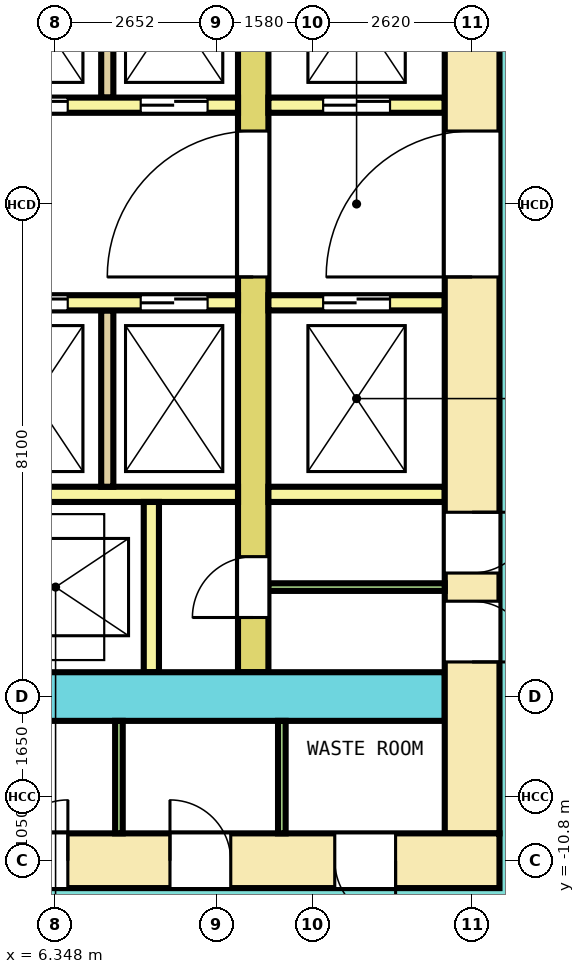
"""IFC4 building model, lengths in metres.
Left out: names, types, materials, properties, quantities, classifications, styles, units other than length and angle.
Written with IfcOpenShell. Run it as: python <this file> out.ifc"""

import sys

from ifc_helpers import new_model, si_unit, direction, frame, frame_2d, origin, place, context, subcontext, project, spatial, rectangle, extrude, element, fill, save


model = new_model("IFC4")
c1 = context("Model", 3, precision=1e-05, world=origin(), true_north=direction((0.0, 1.0)))
c2 = subcontext(c1, "Body", "Model", "MODEL_VIEW")
j1 = project(units=[si_unit("LENGTHUNIT", "METRE"), si_unit("PLANEANGLEUNIT", "RADIAN")], contexts=[c1])
p1 = place(None, origin())
s1 = spatial("IfcSite", under=j1, at=p1, CompositionType="ELEMENT")
p2 = place(p1, origin())
s2 = spatial("IfcBuilding", under=s1, at=p2, CompositionType="ELEMENT")
p3 = place(p2, origin())
s3 = spatial("IfcBuildingStorey", under=s2, at=p3, CompositionType="ELEMENT", Elevation=0.0)
p4 = place(p3, frame((-13.65, -10.8, 0.0), z_axis=(0.0, 0.0, 1.0), x_axis=(1.0, 0.0, 0.0)))
e1 = element("IfcWall", 1, at=p4, inside=s3, PredefinedType="SHEAR", context=c2, shape_type="SweptSolid", body=[
    extrude(rectangle(XDim=27.3, YDim=0.9, at=frame_2d((13.65, 0.0))), origin(), (0.0, 0.0, 1.0), 5.3),
])
p5 = place(p4, frame((2.425, 0.0, 0.0)))
e2 = element("IfcOpeningElement", 2, at=p5, cuts=e1, PredefinedType="OPENING", context=c2, shape_type="SweptSolid", body=[
    extrude(rectangle(XDim=1.0, YDim=2.1, at=frame_2d((0.5, 1.05))), frame((0.0, 0.46, 0.0), z_axis=(0.0, -1.0, 0.0), x_axis=(1.0, 0.0, 0.0)), (0.0, 0.0, 1.0), 0.92),
])
p6 = place(p4, frame((6.569, 0.0, 0.0)))
e3 = element("IfcOpeningElement", 3, at=p6, cuts=e1, PredefinedType="OPENING", context=c2, shape_type="SweptSolid", body=[
    extrude(rectangle(XDim=1.0, YDim=2.1, at=frame_2d((0.5, 1.05))), frame((0.0, 0.46, 0.0), z_axis=(0.0, -1.0, 0.0), x_axis=(1.0, 0.0, 0.0)), (0.0, 0.0, 1.0), 0.92),
])
p7 = place(p4, frame((10.681, 0.0, 0.0)))
e4 = element("IfcOpeningElement", 4, at=p7, cuts=e1, PredefinedType="OPENING", context=c2, shape_type="SweptSolid", body=[
    extrude(rectangle(XDim=1.0, YDim=2.1, at=frame_2d((0.5, 1.05))), frame((0.0, 0.46, 0.0), z_axis=(0.0, -1.0, 0.0), x_axis=(1.0, 0.0, 0.0)), (0.0, 0.0, 1.0), 0.92),
])
p8 = place(p4, frame((19.202, 0.0, 0.0)))
e5 = element("IfcOpeningElement", 5, at=p8, cuts=e1, PredefinedType="OPENING", context=c2, shape_type="SweptSolid", body=[
    extrude(rectangle(XDim=1.0, YDim=2.1, at=frame_2d((0.5, 1.05))), frame((0.0, 0.46, 0.0), z_axis=(0.0, -1.0, 0.0), x_axis=(1.0, 0.0, 0.0)), (0.0, 0.0, 1.0), 0.92),
])
p9 = place(p4, frame((21.881, 0.0, 0.0)))
e6 = element("IfcOpeningElement", 6, at=p9, cuts=e1, PredefinedType="OPENING", context=c2, shape_type="SweptSolid", body=[
    extrude(rectangle(XDim=1.0, YDim=2.1, at=frame_2d((0.5, 1.05))), frame((0.0, 0.46, 0.0), z_axis=(0.0, -1.0, 0.0), x_axis=(1.0, 0.0, 0.0)), (0.0, 0.0, 1.0), 0.92),
])
p10 = place(p4, frame((24.592, 0.0, 0.0)))
e7 = element("IfcOpeningElement", 7, at=p10, cuts=e1, PredefinedType="OPENING", context=c2, shape_type="SweptSolid", body=[
    extrude(rectangle(XDim=1.0, YDim=2.1, at=frame_2d((0.5, 1.05))), frame((0.0, 0.46, 0.0), z_axis=(0.0, -1.0, 0.0), x_axis=(1.0, 0.0, 0.0)), (0.0, 0.0, 1.0), 0.92),
])
p11 = place(p4, frame((15.2, 0.0, 0.0)))
e8 = element("IfcOpeningElement", 8, at=p11, cuts=e1, PredefinedType="OPENING", context=c2, shape_type="SweptSolid", body=[
    extrude(rectangle(XDim=1.2, YDim=2.1, at=frame_2d((0.6, 1.05))), frame((0.0, 0.46, 0.0), z_axis=(0.0, -1.0, 0.0), x_axis=(1.0, 0.0, 0.0)), (0.0, 0.0, 1.0), 0.92),
])
p12 = place(p3, frame((13.2, -10.35, 0.0), z_axis=(0.0, 0.0, 1.0), x_axis=(0.0, 1.0, 0.0)))
e9 = element("IfcWall", 9, at=p12, inside=s3, PredefinedType="SHEAR", context=c2, shape_type="SweptSolid", body=[
    extrude(rectangle(XDim=20.7, YDim=0.9, at=frame_2d((10.35, 0.0))), origin(), (0.0, 0.0, 1.0), 5.3),
])
p13 = place(p12, frame((9.15, 0.0, 0.0)))
e10 = element("IfcOpeningElement", 10, at=p13, cuts=e9, PredefinedType="OPENING", context=c2, shape_type="SweptSolid", body=[
    extrude(rectangle(XDim=2.4, YDim=2.1, at=frame_2d((1.2, 1.05))), frame((0.0, 0.46, 0.0), z_axis=(0.0, -1.0, 0.0), x_axis=(1.0, 0.0, 0.0)), (0.0, 0.0, 1.0), 0.92),
])
p14 = place(p12, frame((16.05, 0.0, 0.0)))
e11 = element("IfcOpeningElement", 11, at=p14, cuts=e9, PredefinedType="OPENING", context=c2, shape_type="SweptSolid", body=[
    extrude(rectangle(XDim=1.2, YDim=2.1, at=frame_2d((0.6, 1.05))), frame((0.0, 0.46, 0.0), z_axis=(0.0, -1.0, 0.0), x_axis=(1.0, 0.0, 0.0)), (0.0, 0.0, 1.0), 0.92),
])
p15 = place(p12, frame((2.819, 0.0, 0.0)))
e12 = element("IfcOpeningElement", 12, at=p15, cuts=e9, PredefinedType="OPENING", context=c2, shape_type="SweptSolid", body=[
    extrude(rectangle(XDim=1.0, YDim=2.1, at=frame_2d((0.5, 1.05))), frame((0.0, 0.46, 0.0), z_axis=(0.0, -1.0, 0.0), x_axis=(1.0, 0.0, 0.0)), (0.0, 0.0, 1.0), 0.92),
])
p16 = place(p12, frame((4.281, 0.0, 0.0)))
e13 = element("IfcOpeningElement", 13, at=p16, cuts=e9, PredefinedType="OPENING", context=c2, shape_type="SweptSolid", body=[
    extrude(rectangle(XDim=1.0, YDim=2.1, at=frame_2d((0.5, 1.05))), frame((0.0, 0.46, 0.0), z_axis=(0.0, -1.0, 0.0), x_axis=(1.0, 0.0, 0.0)), (0.0, 0.0, 1.0), 0.92),
])
p17 = place(p3, frame((-12.75, -8.1, 0.0), z_axis=(0.0, 0.0, 1.0), x_axis=(1.0, 0.0, 0.0)))
e14 = element("IfcWall", 14, at=p17, inside=s3, PredefinedType="SHEAR", context=c2, shape_type="SweptSolid", body=[
    extrude(rectangle(XDim=25.5, YDim=0.8, at=frame_2d((12.75, 0.0))), origin(), (0.0, 0.0, 1.0), 5.3),
])
p18 = place(p17, frame((14.3, 0.0, 0.0)))
e15 = element("IfcOpeningElement", 15, at=p18, cuts=e14, PredefinedType="OPENING", context=c2, shape_type="SweptSolid", body=[
    extrude(rectangle(XDim=1.2, YDim=2.1, at=frame_2d((0.6, 1.05))), frame((0.0, 0.41, 0.0), z_axis=(0.0, -1.0, 0.0), x_axis=(1.0, 0.0, 0.0)), (0.0, 0.0, 1.0), 0.82),
])
p19 = place(p3, frame((9.6, -7.7, 0.0), z_axis=(0.0, 0.0, 1.0), x_axis=(0.0, 1.0, 0.0)))
e16 = element("IfcWall", 16, at=p19, inside=s3, PredefinedType="SHEAR", context=c2, shape_type="SweptSolid", body=[
    extrude(rectangle(XDim=15.4, YDim=0.5, at=frame_2d((7.7, 0.0))), origin(), (0.0, 0.0, 1.0), 5.3),
])
p20 = place(p19, frame((6.5, 0.0, 0.0)))
e17 = element("IfcOpeningElement", 17, at=p20, cuts=e16, PredefinedType="OPENING", context=c2, shape_type="SweptSolid", body=[
    extrude(rectangle(XDim=2.4, YDim=2.1, at=frame_2d((1.2, 1.05))), frame((0.0, 0.26, 0.0), z_axis=(0.0, -1.0, 0.0), x_axis=(1.0, 0.0, 0.0)), (0.0, 0.0, 1.0), 0.52),
])
p21 = place(p19, frame((13.4, 0.0, 0.0)))
e18 = element("IfcOpeningElement", 18, at=p21, cuts=e16, PredefinedType="OPENING", context=c2, shape_type="SweptSolid", body=[
    extrude(rectangle(XDim=1.2, YDim=2.1, at=frame_2d((0.6, 1.05))), frame((0.0, 0.26, 0.0), z_axis=(0.0, -1.0, 0.0), x_axis=(1.0, 0.0, 0.0)), (0.0, 0.0, 1.0), 0.52),
])
p22 = place(p19, frame((0.9, 0.0, 0.0)))
e19 = element("IfcOpeningElement", 19, at=p22, cuts=e16, PredefinedType="OPENING", context=c2, shape_type="SweptSolid", body=[
    extrude(rectangle(XDim=1.0, YDim=2.1, at=frame_2d((0.5, 1.05))), frame((0.0, 0.26, 0.0), z_axis=(0.0, -1.0, 0.0), x_axis=(1.0, 0.0, 0.0)), (0.0, 0.0, 1.0), 0.52),
])
p23 = place(p3, frame((-9.35, 1.625, 0.0), z_axis=(0.0, 0.0, 1.0), x_axis=(1.0, 0.0, 0.0)))
e20 = element("IfcWall", 20, at=p23, inside=s3, PredefinedType="SOLIDWALL", context=c2, shape_type="SweptSolid", body=[
    extrude(rectangle(XDim=18.7, YDim=0.25, at=frame_2d((9.35, 0.0))), origin(), (0.0, 0.0, 1.0), 5.3),
])
p24 = place(p23, frame((0.5, 0.0, 0.0)))
e21 = element("IfcOpeningElement", 21, at=p24, cuts=e20, PredefinedType="OPENING", context=c2, shape_type="SweptSolid", body=[
    extrude(rectangle(XDim=1.1, YDim=2.1, at=frame_2d((0.55, 1.05))), frame((0.0, 0.135, 0.0), z_axis=(0.0, -1.0, 0.0), x_axis=(1.0, 0.0, 0.0)), (0.0, 0.0, 1.0), 0.27),
])
p25 = place(p23, frame((2.85, 0.0, 0.0)))
e22 = element("IfcOpeningElement", 22, at=p25, cuts=e20, PredefinedType="OPENING", context=c2, shape_type="SweptSolid", body=[
    extrude(rectangle(XDim=1.1, YDim=2.1, at=frame_2d((0.55, 1.05))), frame((0.0, 0.135, 0.0), z_axis=(0.0, -1.0, 0.0), x_axis=(1.0, 0.0, 0.0)), (0.0, 0.0, 1.0), 0.27),
])
p26 = place(p23, frame((5.15, 0.0, 0.0)))
e23 = element("IfcOpeningElement", 23, at=p26, cuts=e20, PredefinedType="OPENING", context=c2, shape_type="SweptSolid", body=[
    extrude(rectangle(XDim=1.1, YDim=2.1, at=frame_2d((0.55, 1.05))), frame((0.0, 0.135, 0.0), z_axis=(0.0, -1.0, 0.0), x_axis=(1.0, 0.0, 0.0)), (0.0, 0.0, 1.0), 0.27),
])
p27 = place(p23, frame((7.65, 0.0, 0.0)))
e24 = element("IfcOpeningElement", 24, at=p27, cuts=e20, PredefinedType="OPENING", context=c2, shape_type="SweptSolid", body=[
    extrude(rectangle(XDim=1.1, YDim=2.1, at=frame_2d((0.55, 1.05))), frame((0.0, 0.135, 0.0), z_axis=(0.0, -1.0, 0.0), x_axis=(1.0, 0.0, 0.0)), (0.0, 0.0, 1.0), 0.27),
])
p28 = place(p23, frame((9.95, 0.0, 0.0)))
e25 = element("IfcOpeningElement", 25, at=p28, cuts=e20, PredefinedType="OPENING", context=c2, shape_type="SweptSolid", body=[
    extrude(rectangle(XDim=1.1, YDim=2.1, at=frame_2d((0.55, 1.05))), frame((0.0, 0.135, 0.0), z_axis=(0.0, -1.0, 0.0), x_axis=(1.0, 0.0, 0.0)), (0.0, 0.0, 1.0), 0.27),
])
p29 = place(p23, frame((12.4, 0.0, 0.0)))
e26 = element("IfcOpeningElement", 26, at=p29, cuts=e20, PredefinedType="OPENING", context=c2, shape_type="SweptSolid", body=[
    extrude(rectangle(XDim=1.1, YDim=2.1, at=frame_2d((0.55, 1.05))), frame((0.0, 0.135, 0.0), z_axis=(0.0, -1.0, 0.0), x_axis=(1.0, 0.0, 0.0)), (0.0, 0.0, 1.0), 0.27),
])
p30 = place(p23, frame((14.8, 0.0, 0.0)))
e27 = element("IfcOpeningElement", 27, at=p30, cuts=e20, PredefinedType="OPENING", context=c2, shape_type="SweptSolid", body=[
    extrude(rectangle(XDim=1.1, YDim=2.1, at=frame_2d((0.55, 1.05))), frame((0.0, 0.135, 0.0), z_axis=(0.0, -1.0, 0.0), x_axis=(1.0, 0.0, 0.0)), (0.0, 0.0, 1.0), 0.27),
])
p31 = place(p23, frame((17.1, 0.0, 0.0)))
e28 = element("IfcOpeningElement", 28, at=p31, cuts=e20, PredefinedType="OPENING", context=c2, shape_type="SweptSolid", body=[
    extrude(rectangle(XDim=1.1, YDim=2.1, at=frame_2d((0.55, 1.05))), frame((0.0, 0.135, 0.0), z_axis=(0.0, -1.0, 0.0), x_axis=(1.0, 0.0, 0.0)), (0.0, 0.0, 1.0), 0.27),
])
p32 = place(p3, frame((9.85, 1.625, 0.0), z_axis=(0.0, 0.0, 1.0), x_axis=(1.0, 0.0, 0.0)))
e29 = element("IfcWall", 29, at=p32, inside=s3, PredefinedType="SOLIDWALL", context=c2, shape_type="SweptSolid", body=[
    extrude(rectangle(XDim=2.9, YDim=0.25, at=frame_2d((1.45, 0.0))), origin(), (0.0, 0.0, 1.0), 5.3),
])
p33 = place(p32, frame((0.9, 0.0, 0.0)))
e30 = element("IfcOpeningElement", 30, at=p33, cuts=e29, PredefinedType="OPENING", context=c2, shape_type="SweptSolid", body=[
    extrude(rectangle(XDim=1.1, YDim=2.1, at=frame_2d((0.55, 1.05))), frame((0.0, 0.135, 0.0), z_axis=(0.0, -1.0, 0.0), x_axis=(1.0, 0.0, 0.0)), (0.0, 0.0, 1.0), 0.27),
])
p34 = place(p3, frame((7.2, 1.75, 0.0), z_axis=(0.0, 0.0, 1.0), x_axis=(0.0, 1.0, 0.0)))
e31 = element("IfcWall", 31, at=p34, inside=s3, PredefinedType="SOLIDWALL", context=c2, shape_type="SweptSolid", body=[
    extrude(rectangle(XDim=2.9, YDim=0.2, at=frame_2d((1.45, 0.0))), origin(), (0.0, 0.0, 1.0), 5.3),
])
p35 = place(p3, frame((-9.35, -1.625, 0.0), z_axis=(0.0, 0.0, 1.0), x_axis=(1.0, 0.0, 0.0)))
e32 = element("IfcWall", 32, at=p35, inside=s3, PredefinedType="SOLIDWALL", context=c2, shape_type="SweptSolid", body=[
    extrude(rectangle(XDim=18.7, YDim=0.25, at=frame_2d((9.35, 0.0))), origin(), (0.0, 0.0, 1.0), 5.3),
])
p36 = place(p35, frame((0.5, 0.0, 0.0)))
e33 = element("IfcOpeningElement", 33, at=p36, cuts=e32, PredefinedType="OPENING", context=c2, shape_type="SweptSolid", body=[
    extrude(rectangle(XDim=1.1, YDim=2.1, at=frame_2d((0.55, 1.05))), frame((0.0, 0.135, 0.0), z_axis=(0.0, -1.0, 0.0), x_axis=(1.0, 0.0, 0.0)), (0.0, 0.0, 1.0), 0.27),
])
p37 = place(p35, frame((2.85, 0.0, 0.0)))
e34 = element("IfcOpeningElement", 34, at=p37, cuts=e32, PredefinedType="OPENING", context=c2, shape_type="SweptSolid", body=[
    extrude(rectangle(XDim=1.1, YDim=2.1, at=frame_2d((0.55, 1.05))), frame((0.0, 0.135, 0.0), z_axis=(0.0, -1.0, 0.0), x_axis=(1.0, 0.0, 0.0)), (0.0, 0.0, 1.0), 0.27),
])
p38 = place(p35, frame((5.15, 0.0, 0.0)))
e35 = element("IfcOpeningElement", 35, at=p38, cuts=e32, PredefinedType="OPENING", context=c2, shape_type="SweptSolid", body=[
    extrude(rectangle(XDim=1.1, YDim=2.1, at=frame_2d((0.55, 1.05))), frame((0.0, 0.135, 0.0), z_axis=(0.0, -1.0, 0.0), x_axis=(1.0, 0.0, 0.0)), (0.0, 0.0, 1.0), 0.27),
])
p39 = place(p35, frame((7.65, 0.0, 0.0)))
e36 = element("IfcOpeningElement", 36, at=p39, cuts=e32, PredefinedType="OPENING", context=c2, shape_type="SweptSolid", body=[
    extrude(rectangle(XDim=1.1, YDim=2.1, at=frame_2d((0.55, 1.05))), frame((0.0, 0.135, 0.0), z_axis=(0.0, -1.0, 0.0), x_axis=(1.0, 0.0, 0.0)), (0.0, 0.0, 1.0), 0.27),
])
p40 = place(p35, frame((9.95, 0.0, 0.0)))
e37 = element("IfcOpeningElement", 37, at=p40, cuts=e32, PredefinedType="OPENING", context=c2, shape_type="SweptSolid", body=[
    extrude(rectangle(XDim=1.1, YDim=2.1, at=frame_2d((0.55, 1.05))), frame((0.0, 0.135, 0.0), z_axis=(0.0, -1.0, 0.0), x_axis=(1.0, 0.0, 0.0)), (0.0, 0.0, 1.0), 0.27),
])
p41 = place(p35, frame((12.4, 0.0, 0.0)))
e38 = element("IfcOpeningElement", 38, at=p41, cuts=e32, PredefinedType="OPENING", context=c2, shape_type="SweptSolid", body=[
    extrude(rectangle(XDim=1.1, YDim=2.1, at=frame_2d((0.55, 1.05))), frame((0.0, 0.135, 0.0), z_axis=(0.0, -1.0, 0.0), x_axis=(1.0, 0.0, 0.0)), (0.0, 0.0, 1.0), 0.27),
])
p42 = place(p35, frame((14.8, 0.0, 0.0)))
e39 = element("IfcOpeningElement", 39, at=p42, cuts=e32, PredefinedType="OPENING", context=c2, shape_type="SweptSolid", body=[
    extrude(rectangle(XDim=1.1, YDim=2.1, at=frame_2d((0.55, 1.05))), frame((0.0, 0.135, 0.0), z_axis=(0.0, -1.0, 0.0), x_axis=(1.0, 0.0, 0.0)), (0.0, 0.0, 1.0), 0.27),
])
p43 = place(p35, frame((17.1, 0.0, 0.0)))
e40 = element("IfcOpeningElement", 40, at=p43, cuts=e32, PredefinedType="OPENING", context=c2, shape_type="SweptSolid", body=[
    extrude(rectangle(XDim=1.1, YDim=2.1, at=frame_2d((0.55, 1.05))), frame((0.0, 0.135, 0.0), z_axis=(0.0, -1.0, 0.0), x_axis=(1.0, 0.0, 0.0)), (0.0, 0.0, 1.0), 0.27),
])
p44 = place(p3, frame((9.85, -1.625, 0.0), z_axis=(0.0, 0.0, 1.0), x_axis=(1.0, 0.0, 0.0)))
e41 = element("IfcWall", 41, at=p44, inside=s3, PredefinedType="SOLIDWALL", context=c2, shape_type="SweptSolid", body=[
    extrude(rectangle(XDim=2.9, YDim=0.25, at=frame_2d((1.45, 0.0))), origin(), (0.0, 0.0, 1.0), 5.3),
])
p45 = place(p44, frame((0.9, 0.0, 0.0)))
e42 = element("IfcOpeningElement", 42, at=p45, cuts=e41, PredefinedType="OPENING", context=c2, shape_type="SweptSolid", body=[
    extrude(rectangle(XDim=1.1, YDim=2.1, at=frame_2d((0.55, 1.05))), frame((0.0, 0.135, 0.0), z_axis=(0.0, -1.0, 0.0), x_axis=(1.0, 0.0, 0.0)), (0.0, 0.0, 1.0), 0.27),
])
p46 = place(p3, frame((-9.35, -4.775, 0.0), z_axis=(0.0, 0.0, 1.0), x_axis=(1.0, 0.0, 0.0)))
e43 = element("IfcWall", 43, at=p46, inside=s3, PredefinedType="SOLIDWALL", context=c2, shape_type="SweptSolid", body=[
    extrude(rectangle(XDim=18.7, YDim=0.25, at=frame_2d((9.35, 0.0))), origin(), (0.0, 0.0, 1.0), 5.3),
])
p47 = place(p3, frame((9.85, -4.775, 0.0), z_axis=(0.0, 0.0, 1.0), x_axis=(1.0, 0.0, 0.0)))
e44 = element("IfcWall", 44, at=p47, inside=s3, PredefinedType="SOLIDWALL", context=c2, shape_type="SweptSolid", body=[
    extrude(rectangle(XDim=2.9, YDim=0.25, at=frame_2d((1.45, 0.0))), origin(), (0.0, 0.0, 1.0), 5.3),
])
p48 = place(p3, frame((7.2, -4.65, 0.0), z_axis=(0.0, 0.0, 1.0), x_axis=(0.0, 1.0, 0.0)))
e45 = element("IfcWall", 45, at=p48, inside=s3, PredefinedType="SOLIDWALL", context=c2, shape_type="SweptSolid", body=[
    extrude(rectangle(XDim=2.9, YDim=0.2, at=frame_2d((1.45, 0.0))), origin(), (0.0, 0.0, 1.0), 5.3),
])
p49 = place(p3, frame((7.925, -7.7, 0.0), z_axis=(0.0, 0.0, 1.0), x_axis=(0.0, 1.0, 0.0)))
e46 = element("IfcWall", 46, at=p49, inside=s3, PredefinedType="SOLIDWALL", context=c2, shape_type="SweptSolid", body=[
    extrude(rectangle(XDim=2.8, YDim=0.25, at=frame_2d((1.4, 0.0))), origin(), (0.0, 0.0, 1.0), 5.3),
])
p50 = place(p3, frame((9.85, -6.3, 0.0), z_axis=(0.0, 0.0, 1.0), x_axis=(1.0, 0.0, 0.0)))
e47 = element("IfcWall", 47, at=p50, inside=s3, PredefinedType="PARTITIONING", context=c2, shape_type="SweptSolid", body=[
    extrude(rectangle(XDim=2.9, YDim=0.125, at=frame_2d((1.45, 0.0))), origin(), (0.0, 0.0, 1.0), 5.3),
])
for number, where, z_axis, x_axis in (
    (48, (7.392, -10.35, 0.0), (0.0, 0.0, 1.0), (0.0, 1.0, 0.0)),
    (49, (10.071, -10.35, 0.0), (0.0, 0.0, 1.0), (0.0, 1.0, 0.0)),
):
    element("IfcWall", number, at=place(p3, frame(where, z_axis=z_axis, x_axis=x_axis)), inside=s3, PredefinedType="PARTITIONING", context=c2, shape_type="SweptSolid", body=[
        extrude(rectangle(XDim=1.85, YDim=0.125, at=frame_2d((0.925, 0.0))), origin(), (0.0, 0.0, 1.0), 5.3),
    ])
p51 = place(p30, origin())
e50 = element("IfcDoor", 50, at=p51, inside=s3, OperationType="DOUBLE_DOOR_SLIDING", PredefinedType="DOOR", context=c2, shape_type="SweptSolid", body=[
    extrude(rectangle(XDim=1.1, YDim=2.1, at=frame_2d((0.55, 1.05))), frame((0.0, 0.075, 0.0), z_axis=(0.0, -1.0, 0.0), x_axis=(1.0, 0.0, 0.0)), (0.0, 0.0, 1.0), 0.15),
])
fill(e27, e50)
p52 = place(p31, origin())
e51 = element("IfcDoor", 51, at=p52, inside=s3, OperationType="DOUBLE_DOOR_SLIDING", PredefinedType="DOOR", context=c2, shape_type="SweptSolid", body=[
    extrude(rectangle(XDim=1.1, YDim=2.1, at=frame_2d((0.55, 1.05))), frame((0.0, 0.075, 0.0), z_axis=(0.0, -1.0, 0.0), x_axis=(1.0, 0.0, 0.0)), (0.0, 0.0, 1.0), 0.15),
])
fill(e28, e51)
p53 = place(p33, origin())
e52 = element("IfcDoor", 52, at=p53, inside=s3, OperationType="DOUBLE_DOOR_SLIDING", PredefinedType="DOOR", context=c2, shape_type="SweptSolid", body=[
    extrude(rectangle(XDim=1.1, YDim=2.1, at=frame_2d((0.55, 1.05))), frame((0.0, 0.075, 0.0), z_axis=(0.0, -1.0, 0.0), x_axis=(1.0, 0.0, 0.0)), (0.0, 0.0, 1.0), 0.15),
])
fill(e30, e52)
p54 = place(p42, origin())
e53 = element("IfcDoor", 53, at=p54, inside=s3, OperationType="DOUBLE_DOOR_SLIDING", PredefinedType="DOOR", context=c2, shape_type="SweptSolid", body=[
    extrude(rectangle(XDim=1.1, YDim=2.1, at=frame_2d((0.55, 1.05))), frame((0.0, 0.075, 0.0), z_axis=(0.0, -1.0, 0.0), x_axis=(1.0, 0.0, 0.0)), (0.0, 0.0, 1.0), 0.15),
])
fill(e39, e53)
p55 = place(p43, origin())
e54 = element("IfcDoor", 54, at=p55, inside=s3, OperationType="DOUBLE_DOOR_SLIDING", PredefinedType="DOOR", context=c2, shape_type="SweptSolid", body=[
    extrude(rectangle(XDim=1.1, YDim=2.1, at=frame_2d((0.55, 1.05))), frame((0.0, 0.075, 0.0), z_axis=(0.0, -1.0, 0.0), x_axis=(1.0, 0.0, 0.0)), (0.0, 0.0, 1.0), 0.15),
])
fill(e40, e54)
p56 = place(p45, origin())
e55 = element("IfcDoor", 55, at=p56, inside=s3, OperationType="DOUBLE_DOOR_SLIDING", PredefinedType="DOOR", context=c2, shape_type="SweptSolid", body=[
    extrude(rectangle(XDim=1.1, YDim=2.1, at=frame_2d((0.55, 1.05))), frame((0.0, 0.075, 0.0), z_axis=(0.0, -1.0, 0.0), x_axis=(1.0, 0.0, 0.0)), (0.0, 0.0, 1.0), 0.15),
])
fill(e42, e55)
p57 = place(p20, origin())
e56 = element("IfcDoor", 56, at=p57, inside=s3, OperationType="DOUBLE_DOOR_SINGLE_SWING", PredefinedType="DOOR", context=c2, shape_type="SweptSolid", body=[
    extrude(rectangle(XDim=2.4, YDim=2.1, at=frame_2d((1.2, 1.05))), frame((0.0, 0.2, 0.0), z_axis=(0.0, -1.0, 0.0), x_axis=(1.0, 0.0, 0.0)), (0.0, 0.0, 1.0), 0.4),
])
fill(e17, e56)
p58 = place(p13, origin())
e57 = element("IfcDoor", 57, at=p58, inside=s3, OperationType="DOUBLE_DOOR_SINGLE_SWING", PredefinedType="DOOR", context=c2, shape_type="SweptSolid", body=[
    extrude(rectangle(XDim=2.4, YDim=2.1, at=frame_2d((1.2, 1.05))), frame((0.0, 0.3, 0.0), z_axis=(0.0, -1.0, 0.0), x_axis=(1.0, 0.0, 0.0)), (0.0, 0.0, 1.0), 0.6),
])
fill(e10, e57)
p59 = place(p22, origin())
e58 = element("IfcDoor", 58, at=p59, inside=s3, OperationType="SINGLE_SWING_LEFT", PredefinedType="DOOR", context=c2, shape_type="SweptSolid", body=[
    extrude(rectangle(XDim=1.0, YDim=2.1, at=frame_2d((0.5, 1.05))), frame((0.0, 0.2, 0.0), z_axis=(0.0, -1.0, 0.0), x_axis=(1.0, 0.0, 0.0)), (0.0, 0.0, 1.0), 0.4),
])
fill(e19, e58)
p60 = place(p15, origin())
e59 = element("IfcDoor", 59, at=p60, inside=s3, OperationType="SINGLE_SWING_RIGHT", PredefinedType="DOOR", context=c2, shape_type="SweptSolid", body=[
    extrude(rectangle(XDim=1.0, YDim=2.1, at=frame_2d((0.5, 1.05))), frame((0.0, 0.3, 0.0), z_axis=(0.0, -1.0, 0.0), x_axis=(1.0, 0.0, 0.0)), (0.0, 0.0, 1.0), 0.6),
])
fill(e12, e59)
p61 = place(p16, origin())
e60 = element("IfcDoor", 60, at=p61, inside=s3, OperationType="SINGLE_SWING_LEFT", PredefinedType="DOOR", context=c2, shape_type="SweptSolid", body=[
    extrude(rectangle(XDim=1.0, YDim=2.1, at=frame_2d((0.5, 1.05))), frame((0.0, 0.3, 0.0), z_axis=(0.0, -1.0, 0.0), x_axis=(1.0, 0.0, 0.0)), (0.0, 0.0, 1.0), 0.6),
])
fill(e13, e60)
p62 = place(p8, origin())
e61 = element("IfcDoor", 61, at=p62, inside=s3, OperationType="SINGLE_SWING_LEFT", PredefinedType="DOOR", context=c2, shape_type="SweptSolid", body=[
    extrude(rectangle(XDim=1.0, YDim=2.1, at=frame_2d((0.5, 1.05))), frame((0.0, 0.3, 0.0), z_axis=(0.0, -1.0, 0.0), x_axis=(1.0, 0.0, 0.0)), (0.0, 0.0, 1.0), 0.6),
])
fill(e5, e61)
p63 = place(p9, origin())
e62 = element("IfcDoor", 62, at=p63, inside=s3, OperationType="SINGLE_SWING_RIGHT", PredefinedType="DOOR", context=c2, shape_type="SweptSolid", body=[
    extrude(rectangle(XDim=1.0, YDim=2.1, at=frame_2d((0.5, 1.05))), frame((0.0, 0.3, 0.0), z_axis=(0.0, -1.0, 0.0), x_axis=(1.0, 0.0, 0.0)), (0.0, 0.0, 1.0), 0.6),
])
fill(e6, e62)
p64 = place(p10, origin())
e63 = element("IfcDoor", 63, at=p64, inside=s3, OperationType="SINGLE_SWING_LEFT", PredefinedType="DOOR", context=c2, shape_type="SweptSolid", body=[
    extrude(rectangle(XDim=1.0, YDim=2.1, at=frame_2d((0.5, 1.05))), frame((0.0, 0.3, 0.0), z_axis=(0.0, -1.0, 0.0), x_axis=(1.0, 0.0, 0.0)), (0.0, 0.0, 1.0), 0.6),
])
fill(e7, e63)
save(model, sys.argv[1])
